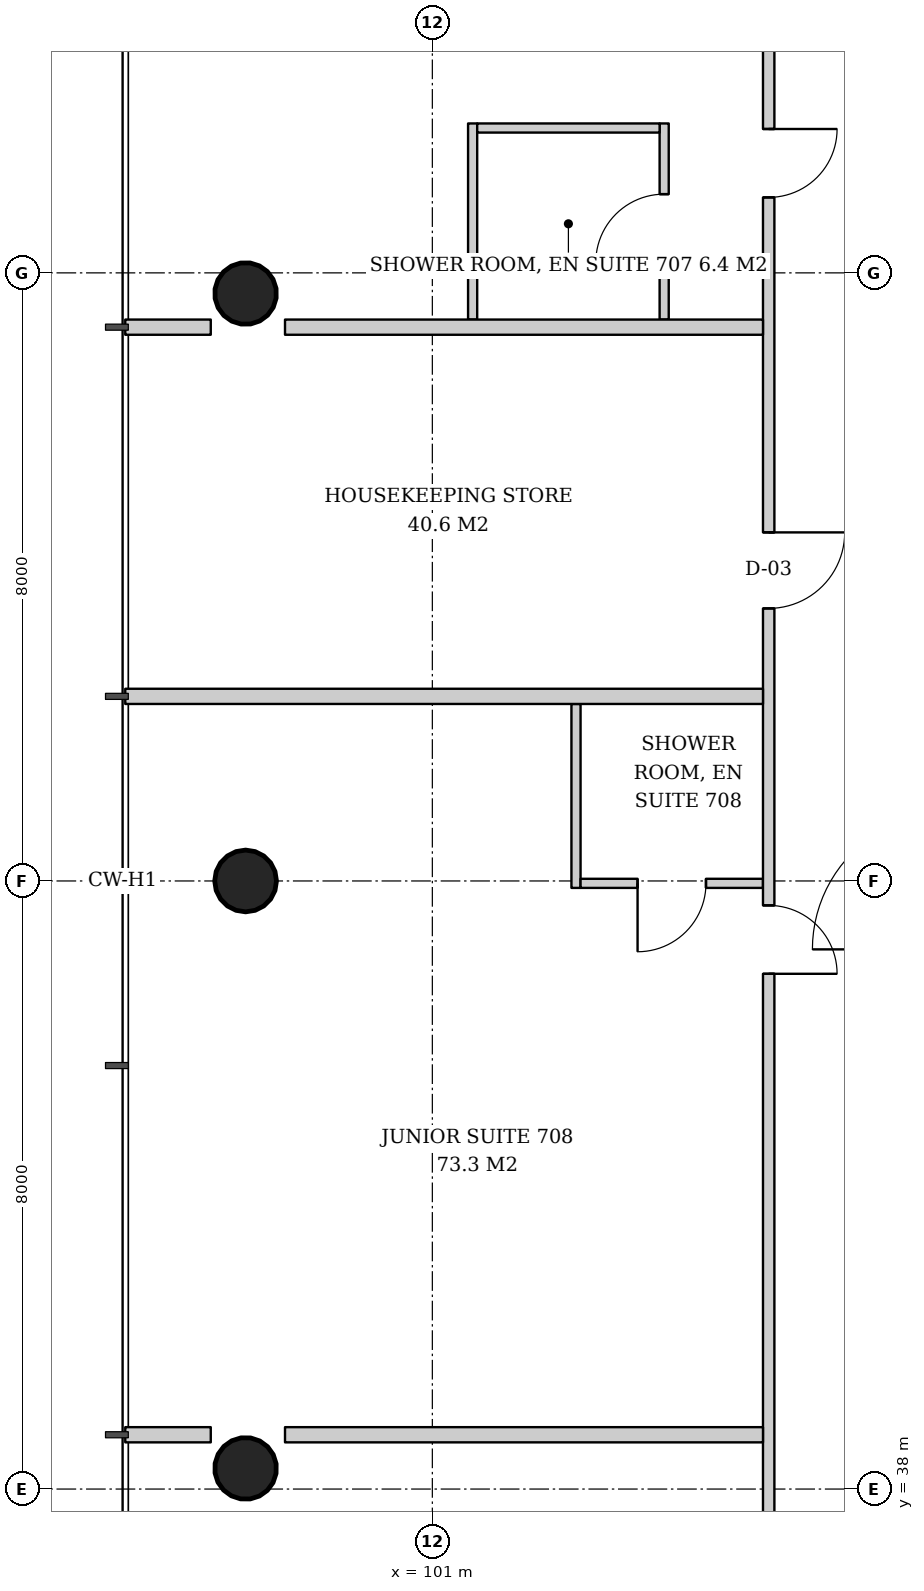
"""IFC4 building model, lengths in metres.
Left out: names, types, materials, properties, quantities, classifications, styles, units other than length and angle.
Written with IfcOpenShell. Run it as: python <this file> out.ifc"""

import sys

from ifc_helpers import new_model, si_unit, direction, frame, frame_2d, origin, origin_2d, place, context, subcontext, project, spatial, rectangle, hollow_circle, extrude, element, fill, save


model = new_model("IFC4")
c1 = context("Model", 3, precision=1e-05, world=origin(), true_north=direction((0.0, 1.0)))
c2 = subcontext(c1, "Body", "Model", "MODEL_VIEW")
j1 = project(units=[si_unit("LENGTHUNIT", "METRE"), si_unit("PLANEANGLEUNIT", "RADIAN")], contexts=[c1])
p1 = place(None, origin())
s1 = spatial("IfcSite", under=j1, at=p1, CompositionType="ELEMENT")
p2 = place(p1, origin())
s2 = spatial("IfcBuilding", under=s1, at=p2, CompositionType="ELEMENT")
p3 = place(p2, frame((0.0, 0.0, 32.4)))
s3 = spatial("IfcBuildingStorey", under=s2, at=p3, CompositionType="ELEMENT", Elevation=32.4)
p4 = place(p3, frame((98.491, 53.754, 0.0), z_axis=(0.043059525333, -0.021561848751, 0.998839808957), x_axis=(0.44774654769, 0.894160516368, 0.0)))
e1 = element("IfcColumn", 1, at=p4, inside=s3, PredefinedType="COLUMN", context=c2, shape_type="SweptSolid", body=[
    extrude(hollow_circle(Radius=0.406, WallThickness=0.03, at=origin_2d()), origin(), (0.0, 0.0, 1.0), 3.804),
])
p5 = place(p3, frame((98.491, 46.0, 0.0), z_axis=(0.043069538298, 0.0, 0.999072076915), x_axis=(0.0, 1.0, 0.0)))
e2 = element("IfcColumn", 2, at=p5, inside=s3, PredefinedType="COLUMN", context=c2, shape_type="SweptSolid", body=[
    extrude(hollow_circle(Radius=0.406, WallThickness=0.03, at=origin_2d()), origin(), (0.0, 0.0, 1.0), 3.803),
])
p6 = place(p3, frame((98.491, 38.246, 0.0), z_axis=(0.043059525333, 0.021561848751, 0.998839808957), x_axis=(-0.44774654769, 0.894160516368, 0.0)))
e3 = element("IfcColumn", 3, at=p6, inside=s3, PredefinedType="COLUMN", context=c2, shape_type="SweptSolid", body=[
    extrude(hollow_circle(Radius=0.406, WallThickness=0.03, at=origin_2d()), origin(), (0.0, 0.0, 1.0), 3.804),
])
p7 = place(p3, frame((104.05, 53.386, 0.0), z_axis=(0.0, 0.0, 1.0), x_axis=(0.0, 1.0, 0.0)))
e4 = element("IfcWall", 4, at=p7, inside=s3, PredefinedType="PARTITIONING", context=c2, shape_type="SweptSolid", body=[
    extrude(rectangle(XDim=2.58, YDim=0.12, at=frame_2d((1.29, 0.0))), origin(), (0.0, 0.0, 1.0), 2.8),
])
p8 = place(p7, frame((0.75, 0.0, 0.0)))
e5 = element("IfcOpeningElement", 5, at=p8, cuts=e4, PredefinedType="OPENING", context=c2, shape_type="SweptSolid", body=[
    extrude(rectangle(XDim=0.9, YDim=2.1, at=frame_2d((0.45, 1.05))), frame((0.0, 0.07, 0.0), z_axis=(0.0, -1.0, 0.0), x_axis=(1.0, 0.0, 0.0)), (0.0, 0.0, 1.0), 0.14),
])
p9 = place(p3, frame((101.53, 53.386, 0.0), z_axis=(0.0, 0.0, 1.0), x_axis=(0.0, 1.0, 0.0)))
e6 = element("IfcWall", 6, at=p9, inside=s3, PredefinedType="PARTITIONING", context=c2, shape_type="SweptSolid", body=[
    extrude(rectangle(XDim=2.58, YDim=0.12, at=frame_2d((1.29, 0.0))), origin(), (0.0, 0.0, 1.0), 2.8),
])
p10 = place(p3, frame((103.99, 55.906, 0.0), z_axis=(0.0, 0.0, 1.0), x_axis=(-1.0, 0.0, 0.0)))
e7 = element("IfcWall", 7, at=p10, inside=s3, PredefinedType="PARTITIONING", context=c2, shape_type="SweptSolid", body=[
    extrude(rectangle(XDim=2.4, YDim=0.12, at=frame_2d((1.2, 0.0))), origin(), (0.0, 0.0, 1.0), 2.847),
])
p11 = place(p3, frame((102.89, 48.329, 0.0), z_axis=(0.0, 0.0, 1.0), x_axis=(0.0, -1.0, 0.0)))
e8 = element("IfcWall", 8, at=p11, inside=s3, PredefinedType="PARTITIONING", context=c2, shape_type="SweptSolid", body=[
    extrude(rectangle(XDim=2.42, YDim=0.12, at=frame_2d((1.21, 0.0))), origin(), (0.0, 0.0, 1.0), 2.847),
])
p12 = place(p3, frame((105.35, 45.969, 0.0), z_axis=(0.0, 0.0, 1.0), x_axis=(-1.0, 0.0, 0.0)))
e9 = element("IfcWall", 9, at=p12, inside=s3, PredefinedType="PARTITIONING", context=c2, shape_type="SweptSolid", body=[
    extrude(rectangle(XDim=2.4, YDim=0.12, at=frame_2d((1.2, 0.0))), origin(), (0.0, 0.0, 1.0), 3.6),
])
p13 = place(p12, frame((0.75, 0.0, 0.0)))
e10 = element("IfcOpeningElement", 10, at=p13, cuts=e9, PredefinedType="OPENING", context=c2, shape_type="SweptSolid", body=[
    extrude(rectangle(XDim=0.9, YDim=2.1, at=frame_2d((0.45, 1.05))), frame((0.0, 0.07, 0.0), z_axis=(0.0, -1.0, 0.0), x_axis=(1.0, 0.0, 0.0)), (0.0, 0.0, 1.0), 0.14),
])
p14 = place(p3, frame((105.425, 57.65, 0.0), z_axis=(0.0, 0.0, 1.0), x_axis=(0.0, -1.0, 0.0)))
e11 = element("IfcWall", 11, at=p14, inside=s3, PredefinedType="PARTITIONING", context=c2, shape_type="SweptSolid", body=[
    extrude(rectangle(XDim=23.15, YDim=0.15, at=frame_2d((11.575, 0.0))), origin(), (0.0, 0.0, 1.0), 2.8),
])
p15 = place(p14, frame((1.757, 0.0, 0.0)))
e12 = element("IfcOpeningElement", 12, at=p15, cuts=e11, PredefinedType="OPENING", context=c2, shape_type="SweptSolid", body=[
    extrude(rectangle(XDim=0.9, YDim=2.1, at=frame_2d((0.45, 1.05))), frame((0.0, 0.085, 0.0), z_axis=(0.0, -1.0, 0.0), x_axis=(1.0, 0.0, 0.0)), (0.0, 0.0, 1.0), 0.17),
])
p16 = place(p14, frame((7.064, 0.0, 0.0)))
e13 = element("IfcOpeningElement", 13, at=p16, cuts=e11, PredefinedType="OPENING", context=c2, shape_type="SweptSolid", body=[
    extrude(rectangle(XDim=1.0, YDim=2.1, at=frame_2d((0.5, 1.05))), frame((0.0, 0.085, 0.0), z_axis=(0.0, -1.0, 0.0), x_axis=(1.0, 0.0, 0.0)), (0.0, 0.0, 1.0), 0.17),
])
p17 = place(p14, frame((11.971, 0.0, 0.0)))
e14 = element("IfcOpeningElement", 14, at=p17, cuts=e11, PredefinedType="OPENING", context=c2, shape_type="SweptSolid", body=[
    extrude(rectangle(XDim=0.9, YDim=2.1, at=frame_2d((0.45, 1.05))), frame((0.0, 0.085, 0.0), z_axis=(0.0, -1.0, 0.0), x_axis=(1.0, 0.0, 0.0)), (0.0, 0.0, 1.0), 0.17),
])
p18 = place(p3, frame((105.35, 53.286, 0.0), z_axis=(0.0, 0.0, 1.0), x_axis=(-1.0, 0.0, 0.0)))
e15 = element("IfcWall", 15, at=p18, inside=s3, PredefinedType="PARTITIONING", context=c2, shape_type="SweptSolid", body=[
    extrude(rectangle(XDim=6.288, YDim=0.2, at=frame_2d((3.144, 0.0))), origin(), (0.0, 0.0, 1.0), 3.6),
])
p19 = place(p3, frame((98.085, 53.286, 0.0), z_axis=(0.0, 0.0, 1.0), x_axis=(-1.0, 0.0, 0.0)))
e16 = element("IfcWall", 16, at=p19, inside=s3, PredefinedType="PARTITIONING", context=c2, shape_type="SweptSolid", body=[
    extrude(rectangle(XDim=1.125, YDim=0.2, at=frame_2d((0.562, 0.0))), origin(), (0.0, 0.0, 1.0), 3.6),
])
p20 = place(p3, frame((105.35, 48.428, 0.0), z_axis=(0.0, 0.0, 1.0), x_axis=(-1.0, 0.0, 0.0)))
e17 = element("IfcWall", 17, at=p20, inside=s3, PredefinedType="PARTITIONING", context=c2, shape_type="SweptSolid", body=[
    extrude(rectangle(XDim=8.39, YDim=0.2, at=frame_2d((4.195, 0.0))), origin(), (0.0, 0.0, 1.0), 3.05),
])
p21 = place(p3, frame((105.35, 38.714, 0.0), z_axis=(0.0, 0.0, 1.0), x_axis=(-1.0, 0.0, 0.0)))
e18 = element("IfcWall", 18, at=p21, inside=s3, PredefinedType="PARTITIONING", context=c2, shape_type="SweptSolid", body=[
    extrude(rectangle(XDim=6.288, YDim=0.2, at=frame_2d((3.144, 0.0))), origin(), (0.0, 0.0, 1.0), 3.6),
])
p22 = place(p3, frame((98.085, 38.714, 0.0), z_axis=(0.0, 0.0, 1.0), x_axis=(-1.0, 0.0, 0.0)))
e19 = element("IfcWall", 19, at=p22, inside=s3, PredefinedType="PARTITIONING", context=c2, shape_type="SweptSolid", body=[
    extrude(rectangle(XDim=1.125, YDim=0.2, at=frame_2d((0.562, 0.0))), origin(), (0.0, 0.0, 1.0), 3.6),
])
p23 = place(p8, origin())
e20 = element("IfcDoor", 20, at=p23, inside=s3, OperationType="SINGLE_SWING_LEFT", PredefinedType="DOOR", context=c2, shape_type="SweptSolid", body=[
    extrude(rectangle(XDim=0.9, YDim=2.1, at=frame_2d((0.45, 1.05))), frame((0.0, 0.025, 0.0), z_axis=(0.0, -1.0, 0.0), x_axis=(1.0, 0.0, 0.0)), (0.0, 0.0, 1.0), 0.05),
])
fill(e5, e20)
p24 = place(p13, origin())
e21 = element("IfcDoor", 21, at=p24, inside=s3, OperationType="SINGLE_SWING_RIGHT", PredefinedType="DOOR", context=c2, shape_type="SweptSolid", body=[
    extrude(rectangle(XDim=0.9, YDim=2.1, at=frame_2d((0.45, 1.05))), frame((0.0, 0.025, 0.0), z_axis=(0.0, -1.0, 0.0), x_axis=(1.0, 0.0, 0.0)), (0.0, 0.0, 1.0), 0.05),
])
fill(e10, e21)
p25 = place(p15, origin())
e22 = element("IfcDoor", 22, at=p25, inside=s3, OperationType="SINGLE_SWING_LEFT", PredefinedType="DOOR", context=c2, shape_type="SweptSolid", body=[
    extrude(rectangle(XDim=0.9, YDim=2.1, at=frame_2d((0.45, 1.05))), frame((0.0, 0.025, 0.0), z_axis=(0.0, -1.0, 0.0), x_axis=(1.0, 0.0, 0.0)), (0.0, 0.0, 1.0), 0.05),
])
fill(e12, e22)
p26 = place(p16, origin())
e23 = element("IfcDoor", 23, at=p26, inside=s3, OperationType="SINGLE_SWING_LEFT", PredefinedType="DOOR", context=c2, shape_type="SweptSolid", body=[
    extrude(rectangle(XDim=1.0, YDim=2.1, at=frame_2d((0.5, 1.05))), frame((0.0, 0.025, 0.0), z_axis=(0.0, -1.0, 0.0), x_axis=(1.0, 0.0, 0.0)), (0.0, 0.0, 1.0), 0.05),
])
fill(e13, e23)
p27 = place(p17, origin())
e24 = element("IfcDoor", 24, at=p27, inside=s3, OperationType="SINGLE_SWING_RIGHT", PredefinedType="DOOR", context=c2, shape_type="SweptSolid", body=[
    extrude(rectangle(XDim=0.9, YDim=2.1, at=frame_2d((0.45, 1.05))), frame((0.0, 0.025, 0.0), z_axis=(0.0, -1.0, 0.0), x_axis=(1.0, 0.0, 0.0)), (0.0, 0.0, 1.0), 0.05),
])
fill(e14, e24)
save(model, sys.argv[1])
